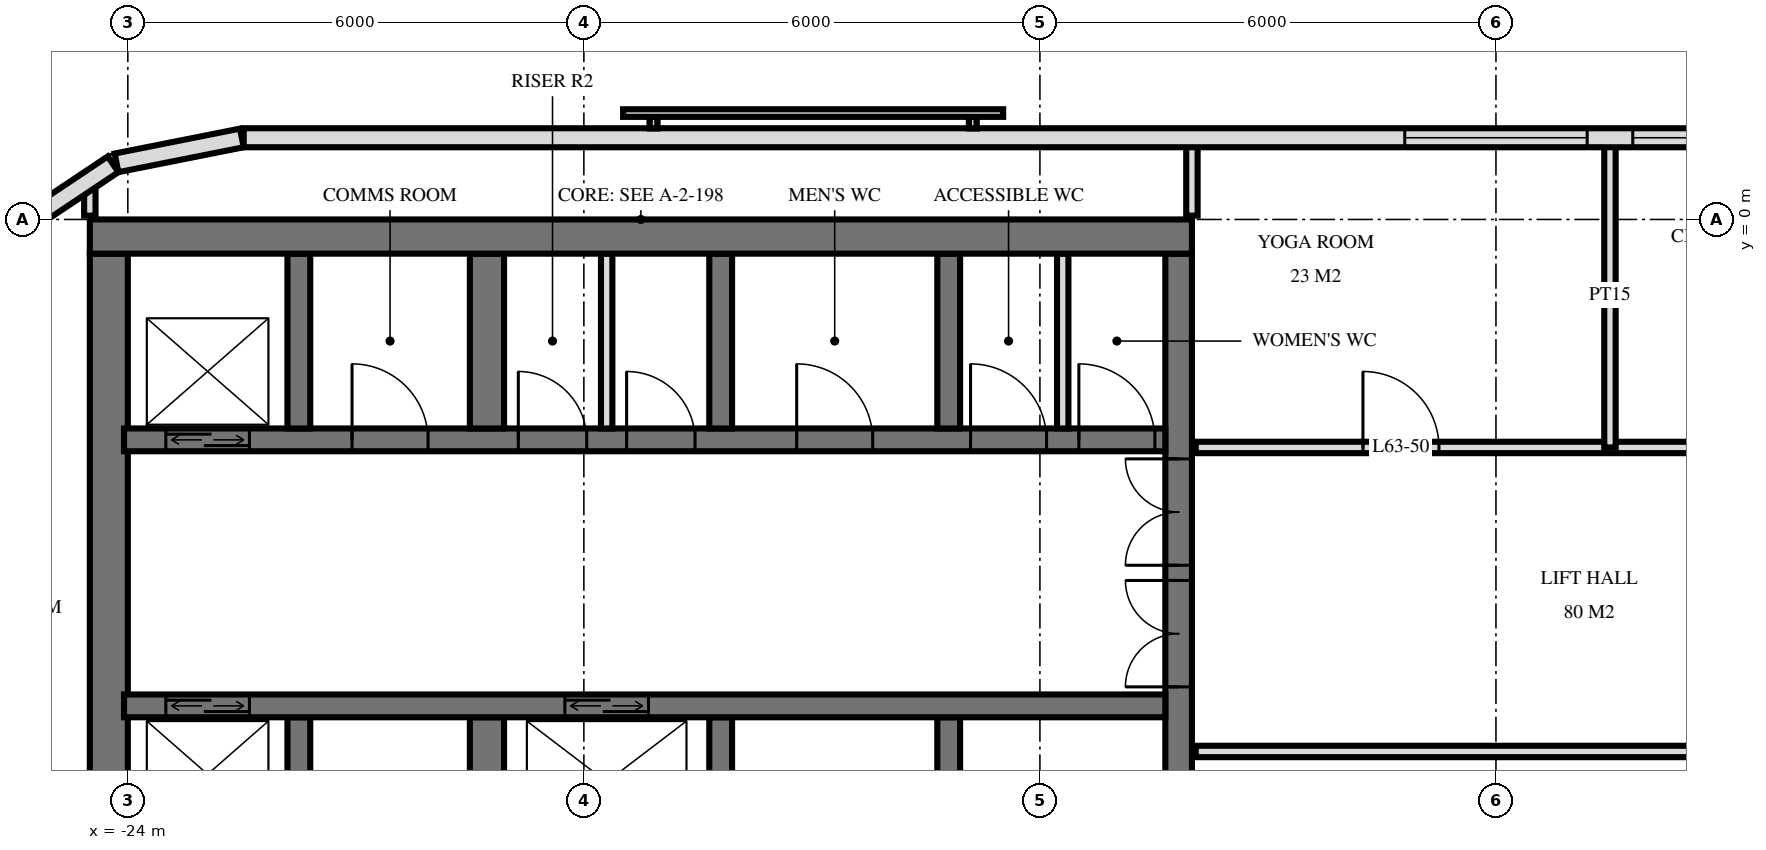
"""IFC4 building model, lengths in metres.
Left out: names, types, materials, properties, quantities, classifications, styles, units other than length and angle.
Written with IfcOpenShell. Run it as: python <this file> out.ifc"""

import sys

from ifc_helpers import new_model, si_unit, direction, frame, frame_2d, origin, place, context, subcontext, project, spatial, rectangle, extrude, element, fill, save


model = new_model("IFC4")
c1 = context("Model", 3, precision=1e-05, world=origin(), true_north=direction((0.0, 1.0)))
c2 = subcontext(c1, "Body", "Model", "MODEL_VIEW")
j1 = project(units=[si_unit("LENGTHUNIT", "METRE"), si_unit("PLANEANGLEUNIT", "RADIAN")], contexts=[c1])
p1 = place(None, origin())
s1 = spatial("IfcSite", under=j1, at=p1, CompositionType="ELEMENT")
p2 = place(p1, origin())
s2 = spatial("IfcBuilding", under=s1, at=p2, CompositionType="ELEMENT")
p3 = place(p2, frame((0.0, 0.0, 239.6)))
s3 = spatial("IfcBuildingStorey", under=s2, at=p3, CompositionType="ELEMENT", Elevation=239.6)
p4 = place(p3, frame((-24.5, -0.225, 0.0), z_axis=(0.0, 0.0, 1.0), x_axis=(1.0, 0.0, 0.0)))
e1 = element("IfcWall", 1, at=p4, inside=s3, PredefinedType="SHEAR", context=c2, shape_type="SweptSolid", body=[
    extrude(rectangle(XDim=14.5, YDim=0.45, at=frame_2d((7.25, 0.0))), origin(), (0.0, 0.0, 1.0), 3.5),
])
p5 = place(p3, frame((-10.175, -14.55, 0.0), z_axis=(0.0, 0.0, 1.0), x_axis=(0.0, 1.0, 0.0)))
e2 = element("IfcWall", 2, at=p5, inside=s3, PredefinedType="SHEAR", context=c2, shape_type="SweptSolid", body=[
    extrude(rectangle(XDim=14.1, YDim=0.35, at=frame_2d((7.05, 0.0))), origin(), (0.0, 0.0, 1.0), 3.5),
])
p6 = place(p5, frame((8.4, 0.0, 0.0)))
e3 = element("IfcOpeningElement", 3, at=p6, cuts=e2, PredefinedType="OPENING", context=c2, shape_type="SweptSolid", body=[
    extrude(rectangle(XDim=1.4, YDim=2.4, at=frame_2d((0.7, 1.2))), frame((0.0, 0.185, 0.0), z_axis=(0.0, -1.0, 0.0), x_axis=(1.0, 0.0, 0.0)), (0.0, 0.0, 1.0), 0.37),
])
p7 = place(p5, frame((10.0, 0.0, 0.0)))
e4 = element("IfcOpeningElement", 4, at=p7, cuts=e2, PredefinedType="OPENING", context=c2, shape_type="SweptSolid", body=[
    extrude(rectangle(XDim=1.4, YDim=2.4, at=frame_2d((0.7, 1.2))), frame((0.0, 0.185, 0.0), z_axis=(0.0, -1.0, 0.0), x_axis=(1.0, 0.0, 0.0)), (0.0, 0.0, 1.0), 0.37),
])
p8 = place(p5, frame((4.0, 0.0, 0.0)))
e5 = element("IfcOpeningElement", 5, at=p8, cuts=e2, PredefinedType="OPENING", context=c2, shape_type="SweptSolid", body=[
    extrude(rectangle(XDim=1.2, YDim=2.1, at=frame_2d((0.6, 1.05))), frame((0.0, 0.185, 0.0), z_axis=(0.0, -1.0, 0.0), x_axis=(1.0, 0.0, 0.0)), (0.0, 0.0, 1.0), 0.37),
])
p9 = place(p3, frame((-24.25, -14.55, 0.0), z_axis=(0.0, 0.0, 1.0), x_axis=(0.0, 1.0, 0.0)))
e6 = element("IfcWall", 6, at=p9, inside=s3, PredefinedType="SHEAR", context=c2, shape_type="SweptSolid", body=[
    extrude(rectangle(XDim=14.1, YDim=0.5, at=frame_2d((7.05, 0.0))), origin(), (0.0, 0.0, 1.0), 3.5),
])
p10 = place(p3, frame((-24.05, -2.9, 0.0), z_axis=(0.0, 0.0, 1.0), x_axis=(1.0, 0.0, 0.0)))
e7 = element("IfcWall", 7, at=p10, inside=s3, PredefinedType="SHEAR", context=c2, shape_type="SweptSolid", body=[
    extrude(rectangle(XDim=13.7, YDim=0.3, at=frame_2d((6.85, 0.0))), origin(), (0.0, 0.0, 1.0), 3.5),
])
p11 = place(p10, frame((0.55, 0.0, 0.0)))
e8 = element("IfcOpeningElement", 8, at=p11, cuts=e7, PredefinedType="OPENING", context=c2, shape_type="SweptSolid", body=[
    extrude(rectangle(XDim=1.1, YDim=2.1, at=frame_2d((0.55, 1.05))), frame((0.0, 0.16, 0.0), z_axis=(0.0, -1.0, 0.0), x_axis=(1.0, 0.0, 0.0)), (0.0, 0.0, 1.0), 0.32),
])
p12 = place(p10, frame((6.613, 0.0, 0.0)))
e9 = element("IfcOpeningElement", 9, at=p12, cuts=e7, PredefinedType="OPENING", context=c2, shape_type="SweptSolid", body=[
    extrude(rectangle(XDim=0.9, YDim=2.1, at=frame_2d((0.45, 1.05))), frame((0.0, 0.16, 0.0), z_axis=(0.0, -1.0, 0.0), x_axis=(1.0, 0.0, 0.0)), (0.0, 0.0, 1.0), 0.32),
])
p13 = place(p10, frame((5.188, 0.0, 0.0)))
e10 = element("IfcOpeningElement", 10, at=p13, cuts=e7, PredefinedType="OPENING", context=c2, shape_type="SweptSolid", body=[
    extrude(rectangle(XDim=0.9, YDim=2.1, at=frame_2d((0.45, 1.05))), frame((0.0, 0.16, 0.0), z_axis=(0.0, -1.0, 0.0), x_axis=(1.0, 0.0, 0.0)), (0.0, 0.0, 1.0), 0.32),
])
p14 = place(p10, frame((12.562, 0.0, 0.0)))
e11 = element("IfcOpeningElement", 11, at=p14, cuts=e7, PredefinedType="OPENING", context=c2, shape_type="SweptSolid", body=[
    extrude(rectangle(XDim=1.0, YDim=2.1, at=frame_2d((0.5, 1.05))), frame((0.0, 0.16, 0.0), z_axis=(0.0, -1.0, 0.0), x_axis=(1.0, 0.0, 0.0)), (0.0, 0.0, 1.0), 0.32),
])
p15 = place(p10, frame((11.137, 0.0, 0.0)))
e12 = element("IfcOpeningElement", 12, at=p15, cuts=e7, PredefinedType="OPENING", context=c2, shape_type="SweptSolid", body=[
    extrude(rectangle(XDim=1.0, YDim=2.1, at=frame_2d((0.5, 1.05))), frame((0.0, 0.16, 0.0), z_axis=(0.0, -1.0, 0.0), x_axis=(1.0, 0.0, 0.0)), (0.0, 0.0, 1.0), 0.32),
])
p16 = place(p10, frame((8.85, 0.0, 0.0)))
e13 = element("IfcOpeningElement", 13, at=p16, cuts=e7, PredefinedType="OPENING", context=c2, shape_type="SweptSolid", body=[
    extrude(rectangle(XDim=1.0, YDim=2.1, at=frame_2d((0.5, 1.05))), frame((0.0, 0.16, 0.0), z_axis=(0.0, -1.0, 0.0), x_axis=(1.0, 0.0, 0.0)), (0.0, 0.0, 1.0), 0.32),
])
p17 = place(p10, frame((3.0, 0.0, 0.0)))
e14 = element("IfcOpeningElement", 14, at=p17, cuts=e7, PredefinedType="OPENING", context=c2, shape_type="SweptSolid", body=[
    extrude(rectangle(XDim=1.0, YDim=2.1, at=frame_2d((0.5, 1.05))), frame((0.0, 0.16, 0.0), z_axis=(0.0, -1.0, 0.0), x_axis=(1.0, 0.0, 0.0)), (0.0, 0.0, 1.0), 0.32),
])
p18 = place(p3, frame((-24.05, -6.4, 0.0), z_axis=(0.0, 0.0, 1.0), x_axis=(1.0, 0.0, 0.0)))
e15 = element("IfcWall", 15, at=p18, inside=s3, PredefinedType="SHEAR", context=c2, shape_type="SweptSolid", body=[
    extrude(rectangle(XDim=13.7, YDim=0.3, at=frame_2d((6.85, 0.0))), origin(), (0.0, 0.0, 1.0), 3.5),
])
p19 = place(p18, frame((0.55, 0.0, 0.0)))
e16 = element("IfcOpeningElement", 16, at=p19, cuts=e15, PredefinedType="OPENING", context=c2, shape_type="SweptSolid", body=[
    extrude(rectangle(XDim=1.1, YDim=2.1, at=frame_2d((0.55, 1.05))), frame((0.0, 0.16, 0.0), z_axis=(0.0, -1.0, 0.0), x_axis=(1.0, 0.0, 0.0)), (0.0, 0.0, 1.0), 0.32),
])
p20 = place(p18, frame((5.8, 0.0, 0.0)))
e17 = element("IfcOpeningElement", 17, at=p20, cuts=e15, PredefinedType="OPENING", context=c2, shape_type="SweptSolid", body=[
    extrude(rectangle(XDim=1.1, YDim=2.1, at=frame_2d((0.55, 1.05))), frame((0.0, 0.16, 0.0), z_axis=(0.0, -1.0, 0.0), x_axis=(1.0, 0.0, 0.0)), (0.0, 0.0, 1.0), 0.32),
])
for number, where, z_axis, x_axis in (
    (18, (-13.2, -2.75, 0.0), (0.0, 0.0, 1.0), (0.0, 1.0, 0.0)),
    (19, (-13.2, -8.85, 0.0), (0.0, 0.0, 1.0), (0.0, 1.0, 0.0)),
    (20, (-16.2, -2.75, 0.0), (0.0, 0.0, 1.0), (0.0, 1.0, 0.0)),
    (21, (-16.2, -8.85, 0.0), (0.0, 0.0, 1.0), (0.0, 1.0, 0.0)),
):
    element("IfcWall", number, at=place(p3, frame(where, z_axis=z_axis, x_axis=x_axis)), inside=s3, PredefinedType="SHEAR", context=c2, shape_type="SweptSolid", body=[
        extrude(rectangle(XDim=2.3, YDim=0.3, at=frame_2d((1.15, 0.0))), origin(), (0.0, 0.0, 1.0), 3.5),
    ])
for number, where, z_axis, x_axis in (
    (22, (-19.275, -2.75, 0.0), (0.0, 0.0, 1.0), (0.0, 1.0, 0.0)),
    (23, (-19.275, -8.85, 0.0), (0.0, 0.0, 1.0), (0.0, 1.0, 0.0)),
):
    element("IfcWall", number, at=place(p3, frame(where, z_axis=z_axis, x_axis=x_axis)), inside=s3, PredefinedType="SHEAR", context=c2, shape_type="SweptSolid", body=[
        extrude(rectangle(XDim=2.3, YDim=0.45, at=frame_2d((1.15, 0.0))), origin(), (0.0, 0.0, 1.0), 3.5),
    ])
for number, where, z_axis, x_axis in (
    (24, (-21.75, -2.75, 0.0), (0.0, 0.0, 1.0), (0.0, 1.0, 0.0)),
    (25, (-21.75, -8.85, 0.0), (0.0, 0.0, 1.0), (0.0, 1.0, 0.0)),
):
    element("IfcWall", number, at=place(p3, frame(where, z_axis=z_axis, x_axis=x_axis)), inside=s3, PredefinedType="SHEAR", context=c2, shape_type="SweptSolid", body=[
        extrude(rectangle(XDim=2.3, YDim=0.3, at=frame_2d((1.15, 0.0))), origin(), (0.0, 0.0, 1.0), 3.5),
    ])
p21 = place(p3, frame((22.475, 1.075, 0.0), z_axis=(0.0, 0.0, 1.0), x_axis=(-1.0, 0.0, 0.0)))
e26 = element("IfcWall", 26, at=p21, inside=s3, PredefinedType="SOLIDWALL", context=c2, shape_type="SweptSolid", body=[
    extrude(rectangle(XDim=44.951, YDim=0.25, at=frame_2d((22.475, 0.0))), origin(), (0.0, 0.0, 1.0), 3.22),
])
p22 = place(p21, frame((18.275, 0.0, 0.9)))
e27 = element("IfcOpeningElement", 27, at=p22, cuts=e26, PredefinedType="OPENING", context=c2, shape_type="SweptSolid", body=[
    extrude(rectangle(XDim=2.4, YDim=1.5, at=frame_2d((1.2, 0.75))), frame((0.0, 0.135, 0.0), z_axis=(0.0, -1.0, 0.0), x_axis=(1.0, 0.0, 0.0)), (0.0, 0.0, 1.0), 0.27),
])
p23 = place(p21, frame((24.275, 0.0, 0.9)))
e28 = element("IfcOpeningElement", 28, at=p23, cuts=e26, PredefinedType="OPENING", context=c2, shape_type="SweptSolid", body=[
    extrude(rectangle(XDim=2.4, YDim=1.5, at=frame_2d((1.2, 0.75))), frame((0.0, 0.135, 0.0), z_axis=(0.0, -1.0, 0.0), x_axis=(1.0, 0.0, 0.0)), (0.0, 0.0, 1.0), 0.27),
])
p24 = place(p21, frame((27.275, 0.0, 0.9)))
e29 = element("IfcOpeningElement", 29, at=p24, cuts=e26, PredefinedType="OPENING", context=c2, shape_type="SweptSolid", body=[
    extrude(rectangle(XDim=2.4, YDim=1.5, at=frame_2d((1.2, 0.75))), frame((0.0, 0.135, 0.0), z_axis=(0.0, -1.0, 0.0), x_axis=(1.0, 0.0, 0.0)), (0.0, 0.0, 1.0), 0.27),
])
p25 = place(p3, frame((-22.5, 1.073, 0.0), z_axis=(0.0, 0.0, 1.0), x_axis=(-0.980803419081, -0.194999110559, 0.0)))
e30 = element("IfcWall", 30, at=p25, inside=s3, PredefinedType="SOLIDWALL", context=c2, shape_type="SweptSolid", body=[
    extrude(rectangle(XDim=1.681, YDim=0.25, at=frame_2d((0.841, 0.0))), origin(), (0.0, 0.0, 1.0), 3.22),
])
p26 = place(p3, frame((-24.194, 0.726, 0.0), z_axis=(0.0, 0.0, 1.0), x_axis=(-0.831482937015, -0.55555029066, 0.0)))
e31 = element("IfcWall", 31, at=p26, inside=s3, PredefinedType="SOLIDWALL", context=c2, shape_type="SweptSolid", body=[
    extrude(rectangle(XDim=1.656, YDim=0.25, at=frame_2d((0.828, 0.0))), origin(), (0.0, 0.0, 1.0), 3.22),
])
for number, where, z_axis, x_axis in (
    (32, (-17.7, -2.75, 0.0), (0.0, 0.0, 1.0), (0.0, 1.0, 0.0)),
    (33, (-11.7, -2.75, 0.0), (0.0, 0.0, 1.0), (0.0, 1.0, 0.0)),
):
    element("IfcWall", number, at=place(p3, frame(where, z_axis=z_axis, x_axis=x_axis)), inside=s3, PredefinedType="PARTITIONING", context=c2, shape_type="SweptSolid", body=[
        extrude(rectangle(XDim=2.3, YDim=0.15, at=frame_2d((1.15, 0.0))), origin(), (0.0, 0.0, 1.0), 3.2),
    ])
p27 = place(p3, frame((-4.5, -3.0, 0.0), z_axis=(0.0, 0.0, 1.0), x_axis=(0.0, 1.0, 0.0)))
e34 = element("IfcWall", 34, at=p27, inside=s3, PredefinedType="PARTITIONING", context=c2, shape_type="SweptSolid", body=[
    extrude(rectangle(XDim=4.02, YDim=0.15, at=frame_2d((2.01, 0.0))), origin(), (0.0, 0.0, 1.0), 3.22),
])
p28 = place(p3, frame((-10.0, 0.05, 0.0), z_axis=(0.0, 0.0, 1.0), x_axis=(0.0, 1.0, 0.0)))
e35 = element("IfcWall", 35, at=p28, inside=s3, PredefinedType="PARTITIONING", context=c2, shape_type="SweptSolid", body=[
    extrude(rectangle(XDim=0.97, YDim=0.15, at=frame_2d((0.485, 0.0))), origin(), (0.0, 0.0, 1.0), 3.22),
])
p29 = place(p3, frame((-24.5, 0.05, 0.0), z_axis=(0.0, 0.0, 1.0), x_axis=(0.0, 1.0, 0.0)))
e36 = element("IfcWall", 36, at=p29, inside=s3, PredefinedType="PARTITIONING", context=c2, shape_type="SweptSolid", body=[
    extrude(rectangle(XDim=0.405, YDim=0.15, at=frame_2d((0.203, 0.0))), origin(), (0.0, 0.0, 1.0), 3.22),
])
p30 = place(p3, frame((-9.95, -7.0, 0.0), z_axis=(0.0, 0.0, 1.0), x_axis=(1.0, 0.0, 0.0)))
e37 = element("IfcWall", 37, at=p30, inside=s3, PredefinedType="PARTITIONING", context=c2, shape_type="SweptSolid", body=[
    extrude(rectangle(XDim=19.9, YDim=0.15, at=frame_2d((9.95, 0.0))), origin(), (0.0, 0.0, 1.0), 3.22),
])
p31 = place(p30, frame((9.45, 0.0, 0.0)))
e38 = element("IfcOpeningElement", 38, at=p31, cuts=e37, PredefinedType="OPENING", context=c2, shape_type="SweptSolid", body=[
    extrude(rectangle(XDim=1.0, YDim=2.1, at=frame_2d((0.5, 1.05))), frame((0.0, 0.085, 0.0), z_axis=(0.0, -1.0, 0.0), x_axis=(1.0, 0.0, 0.0)), (0.0, 0.0, 1.0), 0.17),
])
p32 = place(p30, frame((15.45, 0.0, 0.0)))
e39 = element("IfcOpeningElement", 39, at=p32, cuts=e37, PredefinedType="OPENING", context=c2, shape_type="SweptSolid", body=[
    extrude(rectangle(XDim=1.0, YDim=2.1, at=frame_2d((0.5, 1.05))), frame((0.0, 0.085, 0.0), z_axis=(0.0, -1.0, 0.0), x_axis=(1.0, 0.0, 0.0)), (0.0, 0.0, 1.0), 0.17),
])
p33 = place(p3, frame((-9.95, -3.0, 0.0), z_axis=(0.0, 0.0, 1.0), x_axis=(1.0, 0.0, 0.0)))
e40 = element("IfcWall", 40, at=p33, inside=s3, PredefinedType="PARTITIONING", context=c2, shape_type="SweptSolid", body=[
    extrude(rectangle(XDim=19.9, YDim=0.15, at=frame_2d((9.95, 0.0))), origin(), (0.0, 0.0, 1.0), 3.22),
])
p34 = place(p33, frame((2.2, 0.0, 0.0)))
e41 = element("IfcOpeningElement", 41, at=p34, cuts=e40, PredefinedType="OPENING", context=c2, shape_type="SweptSolid", body=[
    extrude(rectangle(XDim=1.0, YDim=2.1, at=frame_2d((0.5, 1.05))), frame((0.0, 0.085, 0.0), z_axis=(0.0, -1.0, 0.0), x_axis=(1.0, 0.0, 0.0)), (0.0, 0.0, 1.0), 0.17),
])
p35 = place(p33, frame((7.2, 0.0, 0.0)))
e42 = element("IfcOpeningElement", 42, at=p35, cuts=e40, PredefinedType="OPENING", context=c2, shape_type="SweptSolid", body=[
    extrude(rectangle(XDim=1.0, YDim=2.1, at=frame_2d((0.5, 1.05))), frame((0.0, 0.085, 0.0), z_axis=(0.0, -1.0, 0.0), x_axis=(1.0, 0.0, 0.0)), (0.0, 0.0, 1.0), 0.17),
])
p36 = place(p33, frame((11.7, 0.0, 0.0)))
e43 = element("IfcOpeningElement", 43, at=p36, cuts=e40, PredefinedType="OPENING", context=c2, shape_type="SweptSolid", body=[
    extrude(rectangle(XDim=1.0, YDim=2.1, at=frame_2d((0.5, 1.05))), frame((0.0, 0.085, 0.0), z_axis=(0.0, -1.0, 0.0), x_axis=(1.0, 0.0, 0.0)), (0.0, 0.0, 1.0), 0.17),
])
p37 = place(p33, frame((15.45, 0.0, 0.0)))
e44 = element("IfcOpeningElement", 44, at=p37, cuts=e40, PredefinedType="OPENING", context=c2, shape_type="SweptSolid", body=[
    extrude(rectangle(XDim=1.0, YDim=2.1, at=frame_2d((0.5, 1.05))), frame((0.0, 0.085, 0.0), z_axis=(0.0, -1.0, 0.0), x_axis=(1.0, 0.0, 0.0)), (0.0, 0.0, 1.0), 0.17),
])
p38 = place(p33, frame((18.2, 0.0, 0.0)))
e45 = element("IfcOpeningElement", 45, at=p38, cuts=e40, PredefinedType="OPENING", context=c2, shape_type="SweptSolid", body=[
    extrude(rectangle(XDim=1.0, YDim=2.1, at=frame_2d((0.5, 1.05))), frame((0.0, 0.085, 0.0), z_axis=(0.0, -1.0, 0.0), x_axis=(1.0, 0.0, 0.0)), (0.0, 0.0, 1.0), 0.17),
])
p39 = place(p23, origin())
e46 = element("IfcWindow", 46, at=p39, inside=s3, PartitioningType="SINGLE_PANEL", PredefinedType="WINDOW", context=c2, shape_type="SweptSolid", body=[
    extrude(rectangle(XDim=2.4, YDim=1.5, at=frame_2d((1.2, 0.75))), frame((0.0, 0.03, 0.0), z_axis=(0.0, -1.0, 0.0), x_axis=(1.0, 0.0, 0.0)), (0.0, 0.0, 1.0), 0.06),
])
fill(e28, e46)
p40 = place(p24, origin())
e47 = element("IfcWindow", 47, at=p40, inside=s3, PartitioningType="SINGLE_PANEL", PredefinedType="WINDOW", context=c2, shape_type="SweptSolid", body=[
    extrude(rectangle(XDim=2.4, YDim=1.5, at=frame_2d((1.2, 0.75))), frame((0.0, 0.03, 0.0), z_axis=(0.0, -1.0, 0.0), x_axis=(1.0, 0.0, 0.0)), (0.0, 0.0, 1.0), 0.06),
])
fill(e29, e47)
p41 = place(p11, origin())
e48 = element("IfcDoor", 48, at=p41, inside=s3, OperationType="DOUBLE_DOOR_SLIDING", PredefinedType="USERDEFINED", context=c2, shape_type="SweptSolid", body=[
    extrude(rectangle(XDim=1.1, YDim=2.1, at=frame_2d((0.55, 1.05))), frame((0.0, 0.025, 0.0), z_axis=(0.0, -1.0, 0.0), x_axis=(1.0, 0.0, 0.0)), (0.0, 0.0, 1.0), 0.05),
])
fill(e8, e48)
p42 = place(p19, origin())
e49 = element("IfcDoor", 49, at=p42, inside=s3, OperationType="DOUBLE_DOOR_SLIDING", PredefinedType="USERDEFINED", context=c2, shape_type="SweptSolid", body=[
    extrude(rectangle(XDim=1.1, YDim=2.1, at=frame_2d((0.55, 1.05))), frame((0.0, 0.025, 0.0), z_axis=(0.0, -1.0, 0.0), x_axis=(1.0, 0.0, 0.0)), (0.0, 0.0, 1.0), 0.05),
])
fill(e16, e49)
p43 = place(p20, origin())
e50 = element("IfcDoor", 50, at=p43, inside=s3, OperationType="DOUBLE_DOOR_SLIDING", PredefinedType="USERDEFINED", context=c2, shape_type="SweptSolid", body=[
    extrude(rectangle(XDim=1.1, YDim=2.1, at=frame_2d((0.55, 1.05))), frame((0.0, 0.025, 0.0), z_axis=(0.0, -1.0, 0.0), x_axis=(1.0, 0.0, 0.0)), (0.0, 0.0, 1.0), 0.05),
])
fill(e17, e50)
p44 = place(p6, origin())
e51 = element("IfcDoor", 51, at=p44, inside=s3, OperationType="DOUBLE_DOOR_SINGLE_SWING", PredefinedType="DOOR", context=c2, shape_type="SweptSolid", body=[
    extrude(rectangle(XDim=1.4, YDim=2.4, at=frame_2d((0.7, 1.2))), frame((0.0, 0.025, 0.0), z_axis=(0.0, -1.0, 0.0), x_axis=(1.0, 0.0, 0.0)), (0.0, 0.0, 1.0), 0.05),
])
fill(e3, e51)
p45 = place(p7, origin())
e52 = element("IfcDoor", 52, at=p45, inside=s3, OperationType="DOUBLE_DOOR_SINGLE_SWING", PredefinedType="DOOR", context=c2, shape_type="SweptSolid", body=[
    extrude(rectangle(XDim=1.4, YDim=2.4, at=frame_2d((0.7, 1.2))), frame((0.0, 0.025, 0.0), z_axis=(0.0, -1.0, 0.0), x_axis=(1.0, 0.0, 0.0)), (0.0, 0.0, 1.0), 0.05),
])
fill(e4, e52)
p46 = place(p12, origin())
e53 = element("IfcDoor", 53, at=p46, inside=s3, OperationType="SINGLE_SWING_RIGHT", PredefinedType="DOOR", context=c2, shape_type="SweptSolid", body=[
    extrude(rectangle(XDim=0.9, YDim=2.1, at=frame_2d((0.45, 1.05))), frame((0.0, 0.025, 0.0), z_axis=(0.0, -1.0, 0.0), x_axis=(1.0, 0.0, 0.0)), (0.0, 0.0, 1.0), 0.05),
])
fill(e9, e53)
p47 = place(p13, origin())
e54 = element("IfcDoor", 54, at=p47, inside=s3, OperationType="SINGLE_SWING_RIGHT", PredefinedType="DOOR", context=c2, shape_type="SweptSolid", body=[
    extrude(rectangle(XDim=0.9, YDim=2.1, at=frame_2d((0.45, 1.05))), frame((0.0, 0.025, 0.0), z_axis=(0.0, -1.0, 0.0), x_axis=(1.0, 0.0, 0.0)), (0.0, 0.0, 1.0), 0.05),
])
fill(e10, e54)
p48 = place(p14, origin())
e55 = element("IfcDoor", 55, at=p48, inside=s3, OperationType="SINGLE_SWING_RIGHT", PredefinedType="DOOR", context=c2, shape_type="SweptSolid", body=[
    extrude(rectangle(XDim=1.0, YDim=2.1, at=frame_2d((0.5, 1.05))), frame((0.0, 0.025, 0.0), z_axis=(0.0, -1.0, 0.0), x_axis=(1.0, 0.0, 0.0)), (0.0, 0.0, 1.0), 0.05),
])
fill(e11, e55)
p49 = place(p15, origin())
e56 = element("IfcDoor", 56, at=p49, inside=s3, OperationType="SINGLE_SWING_RIGHT", PredefinedType="DOOR", context=c2, shape_type="SweptSolid", body=[
    extrude(rectangle(XDim=1.0, YDim=2.1, at=frame_2d((0.5, 1.05))), frame((0.0, 0.025, 0.0), z_axis=(0.0, -1.0, 0.0), x_axis=(1.0, 0.0, 0.0)), (0.0, 0.0, 1.0), 0.05),
])
fill(e12, e56)
p50 = place(p16, origin())
e57 = element("IfcDoor", 57, at=p50, inside=s3, OperationType="SINGLE_SWING_RIGHT", PredefinedType="DOOR", context=c2, shape_type="SweptSolid", body=[
    extrude(rectangle(XDim=1.0, YDim=2.1, at=frame_2d((0.5, 1.05))), frame((0.0, 0.025, 0.0), z_axis=(0.0, -1.0, 0.0), x_axis=(1.0, 0.0, 0.0)), (0.0, 0.0, 1.0), 0.05),
])
fill(e13, e57)
p51 = place(p17, origin())
e58 = element("IfcDoor", 58, at=p51, inside=s3, OperationType="SINGLE_SWING_RIGHT", PredefinedType="DOOR", context=c2, shape_type="SweptSolid", body=[
    extrude(rectangle(XDim=1.0, YDim=2.1, at=frame_2d((0.5, 1.05))), frame((0.0, 0.025, 0.0), z_axis=(0.0, -1.0, 0.0), x_axis=(1.0, 0.0, 0.0)), (0.0, 0.0, 1.0), 0.05),
])
fill(e14, e58)
p52 = place(p34, origin())
e59 = element("IfcDoor", 59, at=p52, inside=s3, OperationType="SINGLE_SWING_RIGHT", PredefinedType="DOOR", context=c2, shape_type="SweptSolid", body=[
    extrude(rectangle(XDim=1.0, YDim=2.1, at=frame_2d((0.5, 1.05))), frame((0.0, 0.025, 0.0), z_axis=(0.0, -1.0, 0.0), x_axis=(1.0, 0.0, 0.0)), (0.0, 0.0, 1.0), 0.05),
])
fill(e41, e59)
save(model, sys.argv[1])
